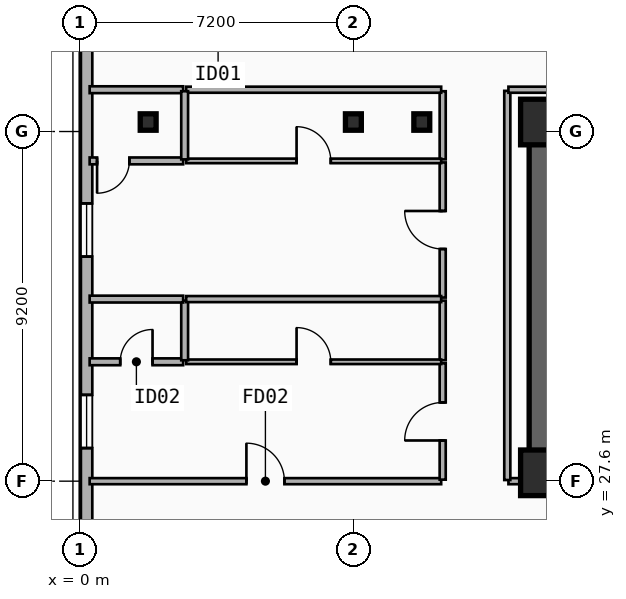
"""IFC4 building model, lengths in metres.
Left out: names, types, materials, properties, quantities, classifications, styles, units other than length and angle.
Written with IfcOpenShell. Run it as: python <this file> out.ifc"""

import sys

from ifc_helpers import new_model, si_unit, direction, frame, frame_2d, origin, origin_2d, place, context, subcontext, project, spatial, rectangle, i_section, extrude, element, fill, save


model = new_model("IFC4")
c1 = context("Model", 3, precision=1e-05, world=origin(), true_north=direction((0.0, 1.0)))
c2 = subcontext(c1, "Body", "Model", "MODEL_VIEW")
j1 = project(units=[si_unit("LENGTHUNIT", "METRE"), si_unit("PLANEANGLEUNIT", "RADIAN")], contexts=[c1])
p1 = place(None, origin())
s1 = spatial("IfcSite", under=j1, at=p1, CompositionType="ELEMENT")
p2 = place(p1, origin())
s2 = spatial("IfcBuilding", under=s1, at=p2, CompositionType="ELEMENT")
p3 = place(p2, frame((0.0, 0.0, 94.3)))
s3 = spatial("IfcBuildingStorey", under=s2, at=p3, CompositionType="ELEMENT", Elevation=94.3)
p4 = place(p3, frame((12.15, 37.05, 0.0), z_axis=(0.0, 0.0, 1.0), x_axis=(1.0, 0.0, 0.0)))
e1 = element("IfcWall", 1, at=p4, inside=s3, PredefinedType="SHEAR", context=c2, shape_type="SweptSolid", body=[
    extrude(rectangle(XDim=33.23, YDim=0.65, at=frame_2d((16.615, 0.0))), origin(), (0.0, 0.0, 1.0), 3.5),
])
p5 = place(p3, frame((21.18, 27.82, 0.0), z_axis=(0.0, 0.0, 1.0), x_axis=(-1.0, 0.0, 0.0)))
e2 = element("IfcWall", 2, at=p5, inside=s3, PredefinedType="SHEAR", context=c2, shape_type="SweptSolid", body=[
    extrude(rectangle(XDim=9.03, YDim=0.65, at=frame_2d((4.515, 0.0))), origin(), (0.0, 0.0, 1.0), 3.5),
])
p6 = place(p5, frame((2.68, 0.0, 0.0)))
e3 = element("IfcOpeningElement", 3, at=p6, cuts=e2, PredefinedType="OPENING", context=c2, shape_type="SweptSolid", body=[
    extrude(rectangle(XDim=1.1, YDim=2.15, at=frame_2d((0.55, 1.075))), frame((0.0, 0.335, 0.0), z_axis=(0.0, -1.0, 0.0), x_axis=(1.0, 0.0, 0.0)), (0.0, 0.0, 1.0), 0.67),
])
p7 = place(p3, frame((12.15, 28.145, 0.0), z_axis=(0.0, 0.0, 1.0), x_axis=(0.0, 1.0, 0.0)))
e4 = element("IfcWall", 4, at=p7, inside=s3, PredefinedType="SHEAR", context=c2, shape_type="SweptSolid", body=[
    extrude(rectangle(XDim=8.58, YDim=0.65, at=frame_2d((4.29, 0.0))), origin(), (0.0, 0.0, 1.0), 3.5),
])
for number, where, z_axis, x_axis in (
    (5, (12.2, 27.82, 0.0), (0.0, 0.0, 1.0), (1.0, 0.0, 0.0)),
    (6, (12.2, 37.05, 0.0), (0.0, 0.0, 1.0), (1.0, 0.0, 0.0)),
):
    element("IfcColumn", number, at=place(p3, frame(where, z_axis=z_axis, x_axis=x_axis)), inside=s3, PredefinedType="COLUMN", context=c2, shape_type="SweptSolid", body=[
        extrude(rectangle(XDim=1.2, YDim=1.2, at=origin_2d()), origin(), (0.0, 0.0, 1.0), 3.5),
    ])
for number, where, z_axis, x_axis in (
    (7, (9.0, 37.05, 0.0), (0.0, 0.0, 1.0), (1.0, 0.0, 0.0)),
    (8, (1.8, 37.05, 0.0), (0.0, 0.0, 1.0), (1.0, 0.0, 0.0)),
    (9, (7.2, 37.05, 0.0), (0.0, 0.0, 1.0), (1.0, 0.0, 0.0)),
):
    element("IfcColumn", number, at=place(p3, frame(where, z_axis=z_axis, x_axis=x_axis)), inside=s3, PredefinedType="COLUMN", context=c2, shape_type="SweptSolid", body=[
        extrude(i_section(OverallWidth=0.418, OverallDepth=0.432, WebThickness=0.035, FlangeThickness=0.056, FilletRadius=0.015, at=origin_2d()), origin(), (0.0, 0.0, 1.0), 3.5),
    ])
p8 = place(p3, frame((0.18, 21.0, 0.0), z_axis=(0.0, 0.0, 1.0), x_axis=(0.0, 1.0, 0.0)))
e10 = element("IfcWall", 10, at=p8, inside=s3, PredefinedType="SOLIDWALL", context=c2, shape_type="SweptSolid", body=[
    extrude(rectangle(XDim=18.0, YDim=0.3, at=frame_2d((9.0, 0.0))), origin(), (0.0, 0.0, 1.0), 3.24),
])
p9 = place(p8, frame((7.47, 0.0, 0.48)))
e11 = element("IfcOpeningElement", 11, at=p9, cuts=e10, PredefinedType="OPENING", context=c2, shape_type="SweptSolid", body=[
    extrude(rectangle(XDim=1.4, YDim=1.8, at=frame_2d((0.7, 0.9))), frame((0.0, 0.16, 0.0), z_axis=(0.0, -1.0, 0.0), x_axis=(1.0, 0.0, 0.0)), (0.0, 0.0, 1.0), 0.32),
])
p10 = place(p8, frame((12.509, 0.0, 0.48)))
e12 = element("IfcOpeningElement", 12, at=p10, cuts=e10, PredefinedType="OPENING", context=c2, shape_type="SweptSolid", body=[
    extrude(rectangle(XDim=1.4, YDim=1.8, at=frame_2d((0.7, 0.9))), frame((0.0, 0.16, 0.0), z_axis=(0.0, -1.0, 0.0), x_axis=(1.0, 0.0, 0.0)), (0.0, 0.0, 1.0), 0.32),
])
p11 = place(p8, frame((0.32, 0.0, 0.65)))
e13 = element("IfcOpeningElement", 13, at=p11, cuts=e10, PredefinedType="OPENING", context=c2, shape_type="SweptSolid", body=[
    extrude(rectangle(XDim=1.4, YDim=1.8, at=frame_2d((0.7, 0.9))), frame((0.0, 0.16, 0.0), z_axis=(0.0, -1.0, 0.0), x_axis=(1.0, 0.0, 0.0)), (0.0, 0.0, 1.0), 0.32),
])
p12 = place(p3, frame((0.26, 27.6, 0.0), z_axis=(0.0, 0.0, 1.0), x_axis=(1.0, 0.0, 0.0)))
e14 = element("IfcWall", 14, at=p12, inside=s3, PredefinedType="PARTITIONING", context=c2, shape_type="SweptSolid", body=[
    extrude(rectangle(XDim=9.25, YDim=0.16, at=frame_2d((4.625, 0.0))), origin(), (0.0, 0.0, 1.0), 2.57),
])
p13 = place(p12, frame((4.125, 0.0, 0.0)))
e15 = element("IfcOpeningElement", 15, at=p13, cuts=e14, PredefinedType="OPENING", context=c2, shape_type="SweptSolid", body=[
    extrude(rectangle(XDim=1.0, YDim=2.15, at=frame_2d((0.5, 1.075))), frame((0.0, 0.09, 0.0), z_axis=(0.0, -1.0, 0.0), x_axis=(1.0, 0.0, 0.0)), (0.0, 0.0, 1.0), 0.18),
])
p14 = place(p3, frame((9.55, 27.64, 0.0), z_axis=(0.0, 0.0, 1.0), x_axis=(0.0, 1.0, 0.0)))
e16 = element("IfcWall", 16, at=p14, inside=s3, PredefinedType="PARTITIONING", context=c2, shape_type="SweptSolid", body=[
    extrude(rectangle(XDim=3.061, YDim=0.16, at=frame_2d((1.531, 0.0))), origin(), (0.0, 0.0, 1.0), 3.24),
])
p15 = place(p14, frame((1.031, 0.0, 0.0)))
e17 = element("IfcOpeningElement", 17, at=p15, cuts=e16, PredefinedType="OPENING", context=c2, shape_type="SweptSolid", body=[
    extrude(rectangle(XDim=1.0, YDim=2.15, at=frame_2d((0.5, 1.075))), frame((0.0, 0.09, 0.0), z_axis=(0.0, -1.0, 0.0), x_axis=(1.0, 0.0, 0.0)), (0.0, 0.0, 1.0), 0.18),
])
p16 = place(p3, frame((9.55, 30.781, 0.0), z_axis=(0.0, 0.0, 1.0), x_axis=(0.0, 1.0, 0.0)))
e18 = element("IfcWall", 18, at=p16, inside=s3, PredefinedType="PARTITIONING", context=c2, shape_type="SweptSolid", body=[
    extrude(rectangle(XDim=1.57, YDim=0.16, at=frame_2d((0.785, 0.0))), origin(), (0.0, 0.0, 1.0), 3.24),
])
p17 = place(p3, frame((9.55, 32.431, 0.0), z_axis=(0.0, 0.0, 1.0), x_axis=(0.0, 1.0, 0.0)))
e19 = element("IfcWall", 19, at=p17, inside=s3, PredefinedType="PARTITIONING", context=c2, shape_type="SweptSolid", body=[
    extrude(rectangle(XDim=3.556, YDim=0.16, at=frame_2d((1.778, 0.0))), origin(), (0.0, 0.0, 1.0), 3.24),
])
p18 = place(p17, frame((1.278, 0.0, 0.0)))
e20 = element("IfcOpeningElement", 20, at=p18, cuts=e19, PredefinedType="OPENING", context=c2, shape_type="SweptSolid", body=[
    extrude(rectangle(XDim=1.0, YDim=2.15, at=frame_2d((0.5, 1.075))), frame((0.0, 0.09, 0.0), z_axis=(0.0, -1.0, 0.0), x_axis=(1.0, 0.0, 0.0)), (0.0, 0.0, 1.0), 0.18),
])
p19 = place(p3, frame((9.55, 36.067, 0.0), z_axis=(0.0, 0.0, 1.0), x_axis=(0.0, 1.0, 0.0)))
e21 = element("IfcWall", 21, at=p19, inside=s3, PredefinedType="PARTITIONING", context=c2, shape_type="SweptSolid", body=[
    extrude(rectangle(XDim=1.793, YDim=0.16, at=frame_2d((0.896, 0.0))), origin(), (0.0, 0.0, 1.0), 2.72),
])
p20 = place(p3, frame((0.26, 37.9, 0.0), z_axis=(0.0, 0.0, 1.0), x_axis=(1.0, 0.0, 0.0)))
e22 = element("IfcWall", 22, at=p20, inside=s3, PredefinedType="PLUMBINGWALL", context=c2, shape_type="SweptSolid", body=[
    extrude(rectangle(XDim=2.46, YDim=0.18, at=frame_2d((1.23, 0.0))), origin(), (0.0, 0.0, 1.0), 3.24),
])
p21 = place(p3, frame((2.8, 37.9, 0.0), z_axis=(0.0, 0.0, 1.0), x_axis=(1.0, 0.0, 0.0)))
e23 = element("IfcWall", 23, at=p21, inside=s3, PredefinedType="PARTITIONING", context=c2, shape_type="SweptSolid", body=[
    extrude(rectangle(XDim=6.71, YDim=0.16, at=frame_2d((3.355, 0.0))), origin(), (0.0, 0.0, 1.0), 3.24),
])
p22 = place(p3, frame((0.26, 30.741, 0.0), z_axis=(0.0, 0.0, 1.0), x_axis=(1.0, 0.0, 0.0)))
e24 = element("IfcWall", 24, at=p22, inside=s3, PredefinedType="PLUMBINGWALL", context=c2, shape_type="SweptSolid", body=[
    extrude(rectangle(XDim=2.46, YDim=0.18, at=frame_2d((1.23, 0.0))), origin(), (0.0, 0.0, 1.0), 2.57),
])
p23 = place(p22, frame((0.805, 0.0, 0.0)))
e25 = element("IfcOpeningElement", 25, at=p23, cuts=e24, PredefinedType="OPENING", context=c2, shape_type="SweptSolid", body=[
    extrude(rectangle(XDim=0.85, YDim=2.1, at=frame_2d((0.425, 1.05))), frame((0.0, 0.1, 0.0), z_axis=(0.0, -1.0, 0.0), x_axis=(1.0, 0.0, 0.0)), (0.0, 0.0, 1.0), 0.2),
])
p24 = place(p3, frame((2.8, 30.741, 0.0), z_axis=(0.0, 0.0, 1.0), x_axis=(1.0, 0.0, 0.0)))
e26 = element("IfcWall", 26, at=p24, inside=s3, PredefinedType="PARTITIONING", context=c2, shape_type="SweptSolid", body=[
    extrude(rectangle(XDim=6.71, YDim=0.12, at=frame_2d((3.355, 0.0))), origin(), (0.0, 0.0, 1.0), 2.57),
])
p25 = place(p24, frame((2.905, 0.0, 0.0)))
e27 = element("IfcOpeningElement", 27, at=p25, cuts=e26, PredefinedType="OPENING", context=c2, shape_type="SweptSolid", body=[
    extrude(rectangle(XDim=0.9, YDim=2.1, at=frame_2d((0.45, 1.05))), frame((0.0, 0.07, 0.0), z_axis=(0.0, -1.0, 0.0), x_axis=(1.0, 0.0, 0.0)), (0.0, 0.0, 1.0), 0.14),
])
p26 = place(p3, frame((2.76, 30.781, 0.0), z_axis=(0.0, 0.0, 1.0), x_axis=(0.0, 1.0, 0.0)))
e28 = element("IfcWall", 28, at=p26, inside=s3, PredefinedType="PLUMBINGWALL", context=c2, shape_type="SweptSolid", body=[
    extrude(rectangle(XDim=1.57, YDim=0.18, at=frame_2d((0.785, 0.0))), origin(), (0.0, 0.0, 1.0), 3.24),
])
p27 = place(p3, frame((0.26, 32.391, 0.0), z_axis=(0.0, 0.0, 1.0), x_axis=(1.0, 0.0, 0.0)))
e29 = element("IfcWall", 29, at=p27, inside=s3, PredefinedType="PLUMBINGWALL", context=c2, shape_type="SweptSolid", body=[
    extrude(rectangle(XDim=2.46, YDim=0.18, at=frame_2d((1.23, 0.0))), origin(), (0.0, 0.0, 1.0), 2.57),
])
p28 = place(p3, frame((2.8, 32.391, 0.0), z_axis=(0.0, 0.0, 1.0), x_axis=(1.0, 0.0, 0.0)))
e30 = element("IfcWall", 30, at=p28, inside=s3, PredefinedType="PARTITIONING", context=c2, shape_type="SweptSolid", body=[
    extrude(rectangle(XDim=6.71, YDim=0.16, at=frame_2d((3.355, 0.0))), origin(), (0.0, 0.0, 1.0), 2.57),
])
p29 = place(p3, frame((2.72, 36.027, 0.0), z_axis=(0.0, 0.0, 1.0), x_axis=(-1.0, 0.0, 0.0)))
e31 = element("IfcWall", 31, at=p29, inside=s3, PredefinedType="PLUMBINGWALL", context=c2, shape_type="SweptSolid", body=[
    extrude(rectangle(XDim=2.46, YDim=0.18, at=frame_2d((1.23, 0.0))), origin(), (0.0, 0.0, 1.0), 2.57),
])
p30 = place(p29, frame((1.415, 0.0, 0.0)))
e32 = element("IfcOpeningElement", 32, at=p30, cuts=e31, PredefinedType="OPENING", context=c2, shape_type="SweptSolid", body=[
    extrude(rectangle(XDim=0.85, YDim=2.1, at=frame_2d((0.425, 1.05))), frame((0.0, 0.1, 0.0), z_axis=(0.0, -1.0, 0.0), x_axis=(1.0, 0.0, 0.0)), (0.0, 0.0, 1.0), 0.2),
])
p31 = place(p3, frame((2.8, 36.027, 0.0), z_axis=(0.0, 0.0, 1.0), x_axis=(1.0, 0.0, 0.0)))
e33 = element("IfcWall", 33, at=p31, inside=s3, PredefinedType="PARTITIONING", context=c2, shape_type="SweptSolid", body=[
    extrude(rectangle(XDim=6.71, YDim=0.12, at=frame_2d((3.355, 0.0))), origin(), (0.0, 0.0, 1.0), 2.57),
])
p32 = place(p31, frame((2.905, 0.0, 0.0)))
e34 = element("IfcOpeningElement", 34, at=p32, cuts=e33, PredefinedType="OPENING", context=c2, shape_type="SweptSolid", body=[
    extrude(rectangle(XDim=0.9, YDim=2.1, at=frame_2d((0.45, 1.05))), frame((0.0, 0.07, 0.0), z_axis=(0.0, -1.0, 0.0), x_axis=(1.0, 0.0, 0.0)), (0.0, 0.0, 1.0), 0.14),
])
p33 = place(p3, frame((2.76, 36.067, 0.0), z_axis=(0.0, 0.0, 1.0), x_axis=(0.0, 1.0, 0.0)))
e35 = element("IfcWall", 35, at=p33, inside=s3, PredefinedType="PLUMBINGWALL", context=c2, shape_type="SweptSolid", body=[
    extrude(rectangle(XDim=1.793, YDim=0.18, at=frame_2d((0.896, 0.0))), origin(), (0.0, 0.0, 1.0), 2.72),
])
p34 = place(p3, frame((11.28, 27.6, 0.0), z_axis=(0.0, 0.0, 1.0), x_axis=(1.0, 0.0, 0.0)))
e36 = element("IfcWall", 36, at=p34, inside=s3, PredefinedType="PARTITIONING", context=c2, shape_type="SweptSolid", body=[
    extrude(rectangle(XDim=0.84, YDim=0.16, at=frame_2d((0.42, 0.0))), origin(), (0.0, 0.0, 1.0), 2.28),
])
p35 = place(p3, frame((11.25, 27.63, 0.0), z_axis=(0.0, 0.0, 1.0), x_axis=(0.0, 1.0, 0.0)))
e37 = element("IfcWall", 37, at=p35, inside=s3, PredefinedType="PARTITIONING", context=c2, shape_type="SweptSolid", body=[
    extrude(rectangle(XDim=10.24, YDim=0.16, at=frame_2d((5.12, 0.0))), origin(), (0.0, 0.0, 1.0), 2.72),
])
p36 = place(p3, frame((11.28, 37.9, 0.0), z_axis=(0.0, 0.0, 1.0), x_axis=(1.0, 0.0, 0.0)))
e38 = element("IfcWall", 38, at=p36, inside=s3, PredefinedType="PARTITIONING", context=c2, shape_type="SweptSolid", body=[
    extrude(rectangle(XDim=35.04, YDim=0.16, at=frame_2d((17.52, 0.0))), origin(), (0.0, 0.0, 1.0), 3.24),
])
p37 = place(p9, origin())
e39 = element("IfcWindow", 39, at=p37, inside=s3, PartitioningType="SINGLE_PANEL", PredefinedType="WINDOW", context=c2, shape_type="SweptSolid", body=[
    extrude(rectangle(XDim=1.4, YDim=1.8, at=frame_2d((0.7, 0.9))), frame((0.0, 0.03, 0.0), z_axis=(0.0, -1.0, 0.0), x_axis=(1.0, 0.0, 0.0)), (0.0, 0.0, 1.0), 0.06),
])
fill(e11, e39)
p38 = place(p10, origin())
e40 = element("IfcWindow", 40, at=p38, inside=s3, PartitioningType="SINGLE_PANEL", PredefinedType="WINDOW", context=c2, shape_type="SweptSolid", body=[
    extrude(rectangle(XDim=1.4, YDim=1.8, at=frame_2d((0.7, 0.9))), frame((0.0, 0.03, 0.0), z_axis=(0.0, -1.0, 0.0), x_axis=(1.0, 0.0, 0.0)), (0.0, 0.0, 1.0), 0.06),
])
fill(e12, e40)
p39 = place(p13, origin())
e41 = element("IfcDoor", 41, at=p39, inside=s3, OperationType="SINGLE_SWING_LEFT", PredefinedType="DOOR", context=c2, shape_type="SweptSolid", body=[
    extrude(rectangle(XDim=1.0, YDim=2.15, at=frame_2d((0.5, 1.075))), frame((0.0, 0.025, 0.0), z_axis=(0.0, -1.0, 0.0), x_axis=(1.0, 0.0, 0.0)), (0.0, 0.0, 1.0), 0.05),
])
fill(e15, e41)
p40 = place(p15, origin())
e42 = element("IfcDoor", 42, at=p40, inside=s3, OperationType="SINGLE_SWING_LEFT", PredefinedType="DOOR", context=c2, shape_type="SweptSolid", body=[
    extrude(rectangle(XDim=1.0, YDim=2.15, at=frame_2d((0.5, 1.075))), frame((0.0, 0.025, 0.0), z_axis=(0.0, -1.0, 0.0), x_axis=(1.0, 0.0, 0.0)), (0.0, 0.0, 1.0), 0.05),
])
fill(e17, e42)
p41 = place(p18, origin())
e43 = element("IfcDoor", 43, at=p41, inside=s3, OperationType="SINGLE_SWING_RIGHT", PredefinedType="DOOR", context=c2, shape_type="SweptSolid", body=[
    extrude(rectangle(XDim=1.0, YDim=2.15, at=frame_2d((0.5, 1.075))), frame((0.0, 0.025, 0.0), z_axis=(0.0, -1.0, 0.0), x_axis=(1.0, 0.0, 0.0)), (0.0, 0.0, 1.0), 0.05),
])
fill(e20, e43)
p42 = place(p23, origin())
e44 = element("IfcDoor", 44, at=p42, inside=s3, OperationType="SINGLE_SWING_RIGHT", PredefinedType="DOOR", context=c2, shape_type="SweptSolid", body=[
    extrude(rectangle(XDim=0.85, YDim=2.1, at=frame_2d((0.425, 1.05))), frame((0.0, 0.025, 0.0), z_axis=(0.0, -1.0, 0.0), x_axis=(1.0, 0.0, 0.0)), (0.0, 0.0, 1.0), 0.05),
])
fill(e25, e44)
p43 = place(p25, origin())
e45 = element("IfcDoor", 45, at=p43, inside=s3, OperationType="SINGLE_SWING_LEFT", PredefinedType="DOOR", context=c2, shape_type="SweptSolid", body=[
    extrude(rectangle(XDim=0.9, YDim=2.1, at=frame_2d((0.45, 1.05))), frame((0.0, 0.025, 0.0), z_axis=(0.0, -1.0, 0.0), x_axis=(1.0, 0.0, 0.0)), (0.0, 0.0, 1.0), 0.05),
])
fill(e27, e45)
p44 = place(p30, origin())
e46 = element("IfcDoor", 46, at=p44, inside=s3, OperationType="SINGLE_SWING_RIGHT", PredefinedType="DOOR", context=c2, shape_type="SweptSolid", body=[
    extrude(rectangle(XDim=0.85, YDim=2.1, at=frame_2d((0.425, 1.05))), frame((0.0, 0.025, 0.0), z_axis=(0.0, -1.0, 0.0), x_axis=(1.0, 0.0, 0.0)), (0.0, 0.0, 1.0), 0.05),
])
fill(e32, e46)
p45 = place(p32, origin())
e47 = element("IfcDoor", 47, at=p45, inside=s3, OperationType="SINGLE_SWING_LEFT", PredefinedType="DOOR", context=c2, shape_type="SweptSolid", body=[
    extrude(rectangle(XDim=0.9, YDim=2.1, at=frame_2d((0.45, 1.05))), frame((0.0, 0.025, 0.0), z_axis=(0.0, -1.0, 0.0), x_axis=(1.0, 0.0, 0.0)), (0.0, 0.0, 1.0), 0.05),
])
fill(e34, e47)
save(model, sys.argv[1])
